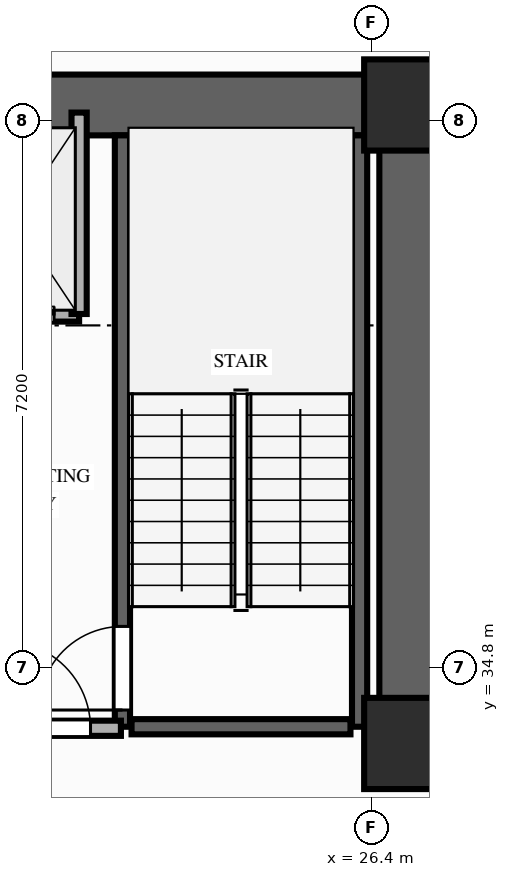
"""IFC4 building model, lengths in metres.
Left out: names, types, materials, properties, quantities, classifications, styles, units other than length and angle.
Written with IfcOpenShell. Run it as: python <this file> out.ifc"""

import sys

from ifc_helpers import new_model, si_unit, direction, frame, frame_2d, origin, origin_2d, place, context, subcontext, project, spatial, rectangle, extrude, element, fill, save


model = new_model("IFC4")
c1 = context("Model", 3, precision=1e-05, world=origin(), true_north=direction((0.0, 1.0)))
c2 = subcontext(c1, "Body", "Model", "MODEL_VIEW")
j1 = project(units=[si_unit("LENGTHUNIT", "METRE"), si_unit("PLANEANGLEUNIT", "RADIAN")], contexts=[c1])
p1 = place(None, origin())
s1 = spatial("IfcSite", under=j1, at=p1, CompositionType="ELEMENT")
p2 = place(p1, origin())
s2 = spatial("IfcBuilding", under=s1, at=p2, CompositionType="ELEMENT")
p3 = place(p2, frame((0.0, 0.0, -3.8)))
s3 = spatial("IfcBuildingStorey", under=s2, at=p3, CompositionType="ELEMENT", Elevation=-3.8)
for number, where, z_axis, x_axis in (
    (1, (26.9, 33.8, 0.0), (0.0, 0.0, 1.0), (1.0, 0.0, 0.0)),
    (2, (26.9, 42.2, 0.0), (0.0, 0.0, 1.0), (1.0, 0.0, 0.0)),
):
    element("IfcColumn", number, at=place(p3, frame(where, z_axis=z_axis, x_axis=x_axis)), inside=s3, PredefinedType="COLUMN", context=c2, shape_type="SweptSolid", body=[
        extrude(rectangle(XDim=1.2, YDim=1.2, at=origin_2d()), origin(), (0.0, 0.0, 1.0), 3.8),
    ])
p4 = place(p3, frame((6.45, 42.2, 0.0), z_axis=(0.0, 0.0, 1.0), x_axis=(1.0, 0.0, 0.0)))
e3 = element("IfcWall", 3, at=p4, inside=s3, PredefinedType="SHEAR", context=c2, shape_type="SweptSolid", body=[
    extrude(rectangle(XDim=20.45, YDim=0.8, at=frame_2d((10.225, 0.0))), origin(), (0.0, 0.0, 1.0), 3.55),
])
p5 = place(p3, frame((26.9, 33.8, 0.0), z_axis=(0.0, 0.0, 1.0), x_axis=(0.0, 1.0, 0.0)))
e4 = element("IfcWall", 4, at=p5, inside=s3, PredefinedType="SHEAR", context=c2, shape_type="SweptSolid", body=[
    extrude(rectangle(XDim=7.95, YDim=0.8, at=frame_2d((3.975, 0.0))), origin(), (0.0, 0.0, 1.0), 3.55),
])
p6 = place(p3, frame((23.12, 34.02, 0.0), z_axis=(0.0, 0.0, 1.0), x_axis=(0.0, 1.0, 0.0)))
e5 = element("IfcWall", 5, at=p6, inside=s3, PredefinedType="SHEAR", context=c2, shape_type="SweptSolid", body=[
    extrude(rectangle(XDim=7.78, YDim=0.2, at=frame_2d((3.89, 0.0))), origin(), (0.0, 0.0, 1.0), 3.55),
])
p7 = place(p6, frame((0.22, 0.0, 0.0)))
e6 = element("IfcOpeningElement", 6, at=p7, cuts=e5, PredefinedType="OPENING", context=c2, shape_type="SweptSolid", body=[
    extrude(rectangle(XDim=1.1, YDim=2.15, at=frame_2d((0.55, 1.075))), frame((0.0, 0.11, 0.0), z_axis=(0.0, -1.0, 0.0), x_axis=(1.0, 0.0, 0.0)), (0.0, 0.0, 1.0), 0.22),
])
p8 = place(p3, frame((26.24, 34.02, 0.0), z_axis=(0.0, 0.0, 1.0), x_axis=(0.0, 1.0, 0.0)))
e7 = element("IfcWall", 7, at=p8, inside=s3, PredefinedType="SHEAR", context=c2, shape_type="SweptSolid", body=[
    extrude(rectangle(XDim=7.78, YDim=0.2, at=frame_2d((3.89, 0.0))), origin(), (0.0, 0.0, 1.0), 3.55),
])
p9 = place(p3, frame((23.24, 34.02, 0.0), z_axis=(0.0, 0.0, 1.0), x_axis=(1.0, 0.0, 0.0)))
e8 = element("IfcWall", 8, at=p9, inside=s3, PredefinedType="SHEAR", context=c2, shape_type="SweptSolid", body=[
    extrude(rectangle(XDim=2.88, YDim=0.2, at=frame_2d((1.44, 0.0))), origin(), (0.0, 0.0, 1.0), 3.55),
])
p10 = place(p3, frame((20.85, 39.45, 0.0), z_axis=(0.0, 0.0, 1.0), x_axis=(1.0, 0.0, 0.0)))
e9 = element("IfcWall", 9, at=p10, inside=s3, PredefinedType="MOVABLE", context=c2, shape_type="SweptSolid", body=[
    extrude(rectangle(XDim=1.7, YDim=0.2, at=frame_2d((0.85, 0.0))), origin(), (0.0, 0.0, 1.0), 3.55),
])
p11 = place(p10, frame((0.32, 0.0, 0.0)))
e10 = element("IfcOpeningElement", 10, at=p11, cuts=e9, PredefinedType="OPENING", context=c2, shape_type="SweptSolid", body=[
    extrude(rectangle(XDim=1.05, YDim=2.15, at=frame_2d((0.525, 1.075))), frame((0.0, 0.11, 0.0), z_axis=(0.0, -1.0, 0.0), x_axis=(1.0, 0.0, 0.0)), (0.0, 0.0, 1.0), 0.22),
])
p12 = place(p3, frame((22.55, 39.45, 0.0), z_axis=(0.0, 0.0, 1.0), x_axis=(0.0, 1.0, 0.0)))
e11 = element("IfcWall", 11, at=p12, inside=s3, PredefinedType="MOVABLE", context=c2, shape_type="SweptSolid", body=[
    extrude(rectangle(XDim=2.65, YDim=0.2, at=frame_2d((1.325, 0.0))), origin(), (0.0, 0.0, 1.0), 3.55),
])
p13 = place(p3, frame((20.5, 34.0, 0.0), z_axis=(0.0, 0.0, 1.0), x_axis=(1.0, 0.0, 0.0)))
e12 = element("IfcWall", 12, at=p13, inside=s3, PredefinedType="PARTITIONING", context=c2, shape_type="SweptSolid", body=[
    extrude(rectangle(XDim=2.6, YDim=0.2, at=frame_2d((1.3, 0.0))), origin(), (0.0, 0.0, 1.0), 2.74),
])
p14 = place(p13, frame((1.05, 0.0, 0.0)))
e13 = element("IfcOpeningElement", 13, at=p14, cuts=e12, PredefinedType="OPENING", context=c2, shape_type="SweptSolid", body=[
    extrude(rectangle(XDim=1.15, YDim=2.15, at=frame_2d((0.575, 1.075))), frame((0.0, 0.11, 0.0), z_axis=(0.0, -1.0, 0.0), x_axis=(1.0, 0.0, 0.0)), (0.0, 0.0, 1.0), 0.22),
])
p15 = place(p7, origin())
e14 = element("IfcDoor", 14, at=p15, inside=s3, OperationType="SINGLE_SWING_LEFT", PredefinedType="DOOR", context=c2, shape_type="SweptSolid", body=[
    extrude(rectangle(XDim=1.1, YDim=2.15, at=frame_2d((0.55, 1.075))), frame((0.0, 0.025, 0.0), z_axis=(0.0, -1.0, 0.0), x_axis=(1.0, 0.0, 0.0)), (0.0, 0.0, 1.0), 0.05),
])
fill(e6, e14)
p16 = place(p11, origin())
e15 = element("IfcDoor", 15, at=p16, inside=s3, OperationType="SLIDING_TO_LEFT", PredefinedType="DOOR", context=c2, shape_type="SweptSolid", body=[
    extrude(rectangle(XDim=1.05, YDim=2.15, at=frame_2d((0.525, 1.075))), frame((0.0, 0.025, 0.0), z_axis=(0.0, -1.0, 0.0), x_axis=(1.0, 0.0, 0.0)), (0.0, 0.0, 1.0), 0.05),
])
fill(e10, e15)
p17 = place(p14, origin())
e16 = element("IfcDoor", 16, at=p17, inside=s3, OperationType="SINGLE_SWING_LEFT", PredefinedType="DOOR", context=c2, shape_type="SweptSolid", body=[
    extrude(rectangle(XDim=1.15, YDim=2.15, at=frame_2d((0.575, 1.075))), frame((0.0, 0.025, 0.0), z_axis=(0.0, -1.0, 0.0), x_axis=(1.0, 0.0, 0.0)), (0.0, 0.0, 1.0), 0.05),
])
fill(e13, e16)
save(model, sys.argv[1])
